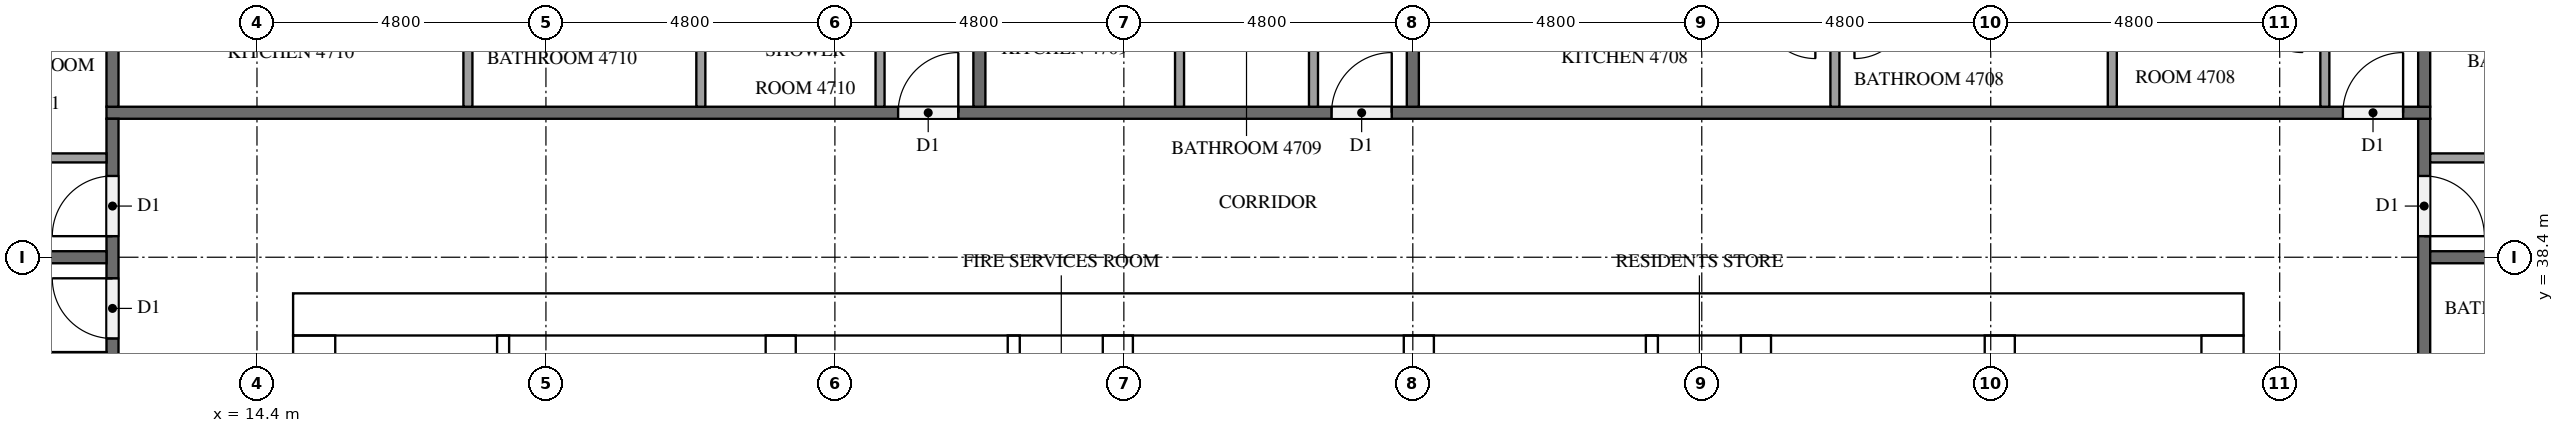
"""IFC4 building model, lengths in metres.
Left out: names, types, materials, properties, quantities, classifications, styles, units other than length and angle.
Written with IfcOpenShell. Run it as: python <this file> out.ifc"""

import sys

from ifc_helpers import new_model, si_unit, direction, frame, frame_2d, origin, place, context, subcontext, project, spatial, rectangle, extrude, element, fill, save


model = new_model("IFC4")
c1 = context("Model", 3, precision=1e-05, world=origin(), true_north=direction((0.0, 1.0)))
c2 = subcontext(c1, "Body", "Model", "MODEL_VIEW")
j1 = project(units=[si_unit("LENGTHUNIT", "METRE"), si_unit("PLANEANGLEUNIT", "RADIAN")], contexts=[c1])
p1 = place(None, origin())
s1 = spatial("IfcSite", under=j1, at=p1, CompositionType="ELEMENT")
p2 = place(p1, origin())
s2 = spatial("IfcBuilding", under=s1, at=p2, CompositionType="ELEMENT")
p3 = place(p2, frame((0.0, 0.0, 182.4)))
s3 = spatial("IfcBuildingStorey", under=s2, at=p3, CompositionType="ELEMENT", Elevation=182.4)
p4 = place(p3, frame((15.0, 37.45, 0.0), z_axis=(0.0, 0.0, 1.0), x_axis=(1.0, 0.0, 0.0)))
e1 = element("IfcWall", 1, at=p4, inside=s3, PredefinedType="SHEAR", context=c2, shape_type="SweptSolid", body=[
    extrude(rectangle(XDim=32.4, YDim=0.7, at=frame_2d((16.2, 0.0))), origin(), (0.0, 0.0, 1.0), 3.2),
])
p5 = place(p4, frame((15.3, 0.0, 0.0)))
e2 = element("IfcOpeningElement", 2, at=p5, cuts=e1, PredefinedType="OPENING", context=c2, shape_type="SweptSolid", body=[
    extrude(rectangle(XDim=1.8, YDim=2.1, at=frame_2d((0.9, 1.05))), frame((0.0, 0.36, 0.0), z_axis=(0.0, -1.0, 0.0), x_axis=(1.0, 0.0, 0.0)), (0.0, 0.0, 1.0), 0.72),
])
p6 = place(p4, frame((1.544, 0.0, 0.0)))
e3 = element("IfcOpeningElement", 3, at=p6, cuts=e1, PredefinedType="OPENING", context=c2, shape_type="SweptSolid", body=[
    extrude(rectangle(XDim=1.0, YDim=2.1, at=frame_2d((0.5, 1.05))), frame((0.0, 0.36, 0.0), z_axis=(0.0, -1.0, 0.0), x_axis=(1.0, 0.0, 0.0)), (0.0, 0.0, 1.0), 0.72),
])
p7 = place(p4, frame((5.219, 0.0, 0.0)))
e4 = element("IfcOpeningElement", 4, at=p7, cuts=e1, PredefinedType="OPENING", context=c2, shape_type="SweptSolid", body=[
    extrude(rectangle(XDim=1.0, YDim=2.1, at=frame_2d((0.5, 1.05))), frame((0.0, 0.36, 0.0), z_axis=(0.0, -1.0, 0.0), x_axis=(1.0, 0.0, 0.0)), (0.0, 0.0, 1.0), 0.72),
])
p8 = place(p3, frame((15.35, 15.7, 0.0), z_axis=(0.0, 0.0, 1.0), x_axis=(0.0, 1.0, 0.0)))
e5 = element("IfcWall", 5, at=p8, inside=s3, PredefinedType="SHEAR", context=c2, shape_type="SweptSolid", body=[
    extrude(rectangle(XDim=21.4, YDim=0.7, at=frame_2d((10.7, 0.0))), origin(), (0.0, 0.0, 1.0), 3.2),
])
p9 = place(p8, frame((5.06, 0.0, 0.0)))
e6 = element("IfcOpeningElement", 6, at=p9, cuts=e5, PredefinedType="OPENING", context=c2, shape_type="SweptSolid", body=[
    extrude(rectangle(XDim=1.2, YDim=2.1, at=frame_2d((0.6, 1.05))), frame((0.0, 0.36, 0.0), z_axis=(0.0, -1.0, 0.0), x_axis=(1.0, 0.0, 0.0)), (0.0, 0.0, 1.0), 0.72),
])
p10 = place(p3, frame((47.05, 15.7, 0.0), z_axis=(0.0, 0.0, 1.0), x_axis=(0.0, 1.0, 0.0)))
e7 = element("IfcWall", 7, at=p10, inside=s3, PredefinedType="SHEAR", context=c2, shape_type="SweptSolid", body=[
    extrude(rectangle(XDim=21.4, YDim=0.7, at=frame_2d((10.7, 0.0))), origin(), (0.0, 0.0, 1.0), 3.2),
])
p11 = place(p10, frame((10.4, 0.0, 0.0)))
e8 = element("IfcOpeningElement", 8, at=p11, cuts=e7, PredefinedType="OPENING", context=c2, shape_type="SweptSolid", body=[
    extrude(rectangle(XDim=1.2, YDim=2.1, at=frame_2d((0.6, 1.05))), frame((0.0, 0.36, 0.0), z_axis=(0.0, -1.0, 0.0), x_axis=(1.0, 0.0, 0.0)), (0.0, 0.0, 1.0), 0.72),
])
p12 = place(p3, frame((23.1, 15.7, 0.0), z_axis=(0.0, 0.0, 1.0), x_axis=(0.0, 1.0, 0.0)))
e9 = element("IfcWall", 9, at=p12, inside=s3, PredefinedType="SHEAR", context=c2, shape_type="SweptSolid", body=[
    extrude(rectangle(XDim=21.4, YDim=0.5, at=frame_2d((10.7, 0.0))), origin(), (0.0, 0.0, 1.0), 3.2),
])
p13 = place(p3, frame((39.3, 27.75, 0.0), z_axis=(0.0, 0.0, 1.0), x_axis=(0.0, 1.0, 0.0)))
e10 = element("IfcWall", 10, at=p13, inside=s3, PredefinedType="SHEAR", context=c2, shape_type="SweptSolid", body=[
    extrude(rectangle(XDim=9.35, YDim=0.5, at=frame_2d((4.675, 0.0))), origin(), (0.0, 0.0, 1.0), 3.2),
])
p14 = place(p3, frame((43.35, 27.75, 0.0), z_axis=(0.0, 0.0, 1.0), x_axis=(0.0, 1.0, 0.0)))
e11 = element("IfcWall", 11, at=p14, inside=s3, PredefinedType="SHEAR", context=c2, shape_type="SweptSolid", body=[
    extrude(rectangle(XDim=9.35, YDim=0.5, at=frame_2d((4.675, 0.0))), origin(), (0.0, 0.0, 1.0), 3.2),
])
p15 = place(p14, frame((7.65, 0.0, 0.0)))
e12 = element("IfcOpeningElement", 12, at=p15, cuts=e11, PredefinedType="OPENING", context=c2, shape_type="SweptSolid", body=[
    extrude(rectangle(XDim=1.2, YDim=2.1, at=frame_2d((0.6, 1.05))), frame((0.0, 0.26, 0.0), z_axis=(0.0, -1.0, 0.0), x_axis=(1.0, 0.0, 0.0)), (0.0, 0.0, 1.0), 0.52),
])
for number, where, z_axis, x_axis in (
    (13, (28.7, 33.8, 0.0), (0.0, 0.0, 1.0), (0.0, 1.0, 0.0)),
    (14, (33.7, 33.8, 0.0), (0.0, 0.0, 1.0), (0.0, 1.0, 0.0)),
):
    element("IfcWall", number, at=place(p3, frame(where, z_axis=z_axis, x_axis=x_axis)), inside=s3, PredefinedType="SHEAR", context=c2, shape_type="SweptSolid", body=[
        extrude(rectangle(XDim=3.3, YDim=0.5, at=frame_2d((1.65, 0.0))), origin(), (0.0, 0.0, 1.0), 3.2),
    ])
p16 = place(p3, frame((18.489, 31.5, 0.0), z_axis=(0.0, 0.0, 1.0), x_axis=(0.0, 1.0, 0.0)))
e15 = element("IfcWall", 15, at=p16, inside=s3, PredefinedType="PARTITIONING", context=c2, shape_type="SweptSolid", body=[
    extrude(rectangle(XDim=5.6, YDim=0.2, at=frame_2d((2.8, 0.0))), origin(), (0.0, 0.0, 1.0), 3.2),
])
for number, where, z_axis, x_axis in (
    (16, (26.971, 33.8, 0.0), (0.0, 0.0, 1.0), (0.0, 1.0, 0.0)),
    (17, (37.571, 33.8, 0.0), (0.0, 0.0, 1.0), (0.0, 1.0, 0.0)),
):
    element("IfcWall", number, at=place(p3, frame(where, z_axis=z_axis, x_axis=x_axis)), inside=s3, PredefinedType="PARTITIONING", context=c2, shape_type="SweptSolid", body=[
        extrude(rectangle(XDim=3.3, YDim=0.2, at=frame_2d((1.65, 0.0))), origin(), (0.0, 0.0, 1.0), 3.2),
    ])
p17 = place(p3, frame((50.4, 40.7, 0.0), z_axis=(0.0, 0.0, 1.0), x_axis=(0.0, -1.0, 0.0)))
e18 = element("IfcWall", 18, at=p17, inside=s3, PredefinedType="PARTITIONING", context=c2, shape_type="SweptSolid", body=[
    extrude(rectangle(XDim=28.6, YDim=0.2, at=frame_2d((14.3, 0.0))), origin(), (0.0, 0.0, 1.0), 3.2),
])
p18 = place(p17, frame((27.3, 0.0, 0.0)))
e19 = element("IfcOpeningElement", 19, at=p18, cuts=e18, PredefinedType="OPENING", context=c2, shape_type="SweptSolid", body=[
    extrude(rectangle(XDim=1.1, YDim=2.1, at=frame_2d((0.55, 1.05))), frame((0.0, 0.11, 0.0), z_axis=(0.0, -1.0, 0.0), x_axis=(1.0, 0.0, 0.0)), (0.0, 0.0, 1.0), 0.22),
])
p19 = place(p17, frame((8.15, 0.0, 0.0)))
e20 = element("IfcOpeningElement", 20, at=p19, cuts=e18, PredefinedType="OPENING", context=c2, shape_type="SweptSolid", body=[
    extrude(rectangle(XDim=1.0, YDim=2.1, at=frame_2d((0.5, 1.05))), frame((0.0, 0.11, 0.0), z_axis=(0.0, -1.0, 0.0), x_axis=(1.0, 0.0, 0.0)), (0.0, 0.0, 1.0), 0.22),
])
p20 = place(p17, frame((0.95, 0.0, 0.0)))
e21 = element("IfcOpeningElement", 21, at=p20, cuts=e18, PredefinedType="OPENING", context=c2, shape_type="SweptSolid", body=[
    extrude(rectangle(XDim=1.0, YDim=2.1, at=frame_2d((0.5, 1.05))), frame((0.0, 0.11, 0.0), z_axis=(0.0, -1.0, 0.0), x_axis=(1.0, 0.0, 0.0)), (0.0, 0.0, 1.0), 0.22),
])
p21 = place(p3, frame((11.9, 40.8, 0.0), z_axis=(0.0, 0.0, 1.0), x_axis=(1.0, 0.0, 0.0)))
e22 = element("IfcWall", 22, at=p21, inside=s3, PredefinedType="PARTITIONING", context=c2, shape_type="SweptSolid", body=[
    extrude(rectangle(XDim=38.6, YDim=0.2, at=frame_2d((19.3, 0.0))), origin(), (0.0, 0.0, 1.0), 3.2),
])
p22 = place(p21, frame((37.15, 0.0, 0.0)))
e23 = element("IfcOpeningElement", 23, at=p22, cuts=e22, PredefinedType="OPENING", context=c2, shape_type="SweptSolid", body=[
    extrude(rectangle(XDim=1.0, YDim=2.1, at=frame_2d((0.5, 1.05))), frame((0.0, 0.11, 0.0), z_axis=(0.0, -1.0, 0.0), x_axis=(1.0, 0.0, 0.0)), (0.0, 0.0, 1.0), 0.22),
])
p23 = place(p21, frame((20.35, 0.0, 0.0)))
e24 = element("IfcOpeningElement", 24, at=p23, cuts=e22, PredefinedType="OPENING", context=c2, shape_type="SweptSolid", body=[
    extrude(rectangle(XDim=1.0, YDim=2.1, at=frame_2d((0.5, 1.05))), frame((0.0, 0.11, 0.0), z_axis=(0.0, -1.0, 0.0), x_axis=(1.0, 0.0, 0.0)), (0.0, 0.0, 1.0), 0.22),
])
p24 = place(p21, frame((13.15, 0.0, 0.0)))
e25 = element("IfcOpeningElement", 25, at=p24, cuts=e22, PredefinedType="OPENING", context=c2, shape_type="SweptSolid", body=[
    extrude(rectangle(XDim=1.0, YDim=2.1, at=frame_2d((0.5, 1.05))), frame((0.0, 0.11, 0.0), z_axis=(0.0, -1.0, 0.0), x_axis=(1.0, 0.0, 0.0)), (0.0, 0.0, 1.0), 0.22),
])
p25 = place(p3, frame((12.0, 12.1, 0.0), z_axis=(0.0, 0.0, 1.0), x_axis=(0.0, 1.0, 0.0)))
e26 = element("IfcWall", 26, at=p25, inside=s3, PredefinedType="PARTITIONING", context=c2, shape_type="SweptSolid", body=[
    extrude(rectangle(XDim=28.6, YDim=0.2, at=frame_2d((14.3, 0.0))), origin(), (0.0, 0.0, 1.0), 3.2),
])
p26 = place(p25, frame((26.65, 0.0, 0.0)))
e27 = element("IfcOpeningElement", 27, at=p26, cuts=e26, PredefinedType="OPENING", context=c2, shape_type="SweptSolid", body=[
    extrude(rectangle(XDim=1.0, YDim=2.1, at=frame_2d((0.5, 1.05))), frame((0.0, 0.11, 0.0), z_axis=(0.0, -1.0, 0.0), x_axis=(1.0, 0.0, 0.0)), (0.0, 0.0, 1.0), 0.22),
])
p27 = place(p25, frame((24.95, 0.0, 0.0)))
e28 = element("IfcOpeningElement", 28, at=p27, cuts=e26, PredefinedType="OPENING", context=c2, shape_type="SweptSolid", body=[
    extrude(rectangle(XDim=1.0, YDim=2.1, at=frame_2d((0.5, 1.05))), frame((0.0, 0.11, 0.0), z_axis=(0.0, -1.0, 0.0), x_axis=(1.0, 0.0, 0.0)), (0.0, 0.0, 1.0), 0.22),
])
p28 = place(p25, frame((12.95, 0.0, 0.0)))
e29 = element("IfcOpeningElement", 29, at=p28, cuts=e26, PredefinedType="OPENING", context=c2, shape_type="SweptSolid", body=[
    extrude(rectangle(XDim=1.0, YDim=2.1, at=frame_2d((0.5, 1.05))), frame((0.0, 0.11, 0.0), z_axis=(0.0, -1.0, 0.0), x_axis=(1.0, 0.0, 0.0)), (0.0, 0.0, 1.0), 0.22),
])
p29 = place(p3, frame((50.5, 38.4, 0.0), z_axis=(0.0, 0.0, 1.0), x_axis=(1.0, 0.0, 0.0)))
e30 = element("IfcWall", 30, at=p29, inside=s3, PredefinedType="PARTITIONING", context=c2, shape_type="SweptSolid", body=[
    extrude(rectangle(XDim=11.8, YDim=0.2, at=frame_2d((5.9, 0.0))), origin(), (0.0, 0.0, 1.0), 3.2),
])
for number, where, z_axis, x_axis in (
    (31, (50.4, 40.9, 0.0), (0.0, 0.0, 1.0), (0.0, 1.0, 0.0)),
    (32, (33.6, 47.9, 0.0), (0.0, 0.0, 1.0), (0.0, -1.0, 0.0)),
    (33, (26.4, 47.9, 0.0), (0.0, 0.0, 1.0), (0.0, -1.0, 0.0)),
    (34, (12.0, 47.9, 0.0), (0.0, 0.0, 1.0), (0.0, -1.0, 0.0)),
    (35, (4.9, 38.4, 0.0), (0.0, 0.0, 1.0), (1.0, 0.0, 0.0)),
):
    element("IfcWall", number, at=place(p3, frame(where, z_axis=z_axis, x_axis=x_axis)), inside=s3, PredefinedType="PARTITIONING", context=c2, shape_type="SweptSolid", body=[
        extrude(rectangle(XDim=7.0, YDim=0.2, at=frame_2d((3.5, 0.0))), origin(), (0.0, 0.0, 1.0), 3.2),
    ])
p30 = place(p3, frame((50.5, 40.05, 0.0), z_axis=(0.0, 0.0, 1.0), x_axis=(1.0, 0.0, 0.0)))
e36 = element("IfcWall", 36, at=p30, inside=s3, PredefinedType="PARTITIONING", context=c2, shape_type="SweptSolid", body=[
    extrude(rectangle(XDim=3.875, YDim=0.15, at=frame_2d((1.938, 0.0))), origin(), (0.0, 0.0, 1.0), 3.2),
])
for number, where, z_axis, x_axis in (
    (37, (45.219, 40.9, 0.0), (0.0, 0.0, 1.0), (0.0, 1.0, 0.0)),
    (38, (40.612, 40.9, 0.0), (0.0, 0.0, 1.0), (0.0, 1.0, 0.0)),
):
    element("IfcWall", number, at=place(p3, frame(where, z_axis=z_axis, x_axis=x_axis)), inside=s3, PredefinedType="PARTITIONING", context=c2, shape_type="SweptSolid", body=[
        extrude(rectangle(XDim=1.625, YDim=0.15, at=frame_2d((0.812, 0.0))), origin(), (0.0, 0.0, 1.0), 3.2),
    ])
p31 = place(p3, frame((48.75, 40.9, 0.0), z_axis=(0.0, 0.0, 1.0), x_axis=(0.0, 1.0, 0.0)))
e39 = element("IfcWall", 39, at=p31, inside=s3, PredefinedType="PARTITIONING", context=c2, shape_type="SweptSolid", body=[
    extrude(rectangle(XDim=1.775, YDim=0.15, at=frame_2d((0.888, 0.0))), origin(), (0.0, 0.0, 1.0), 3.2),
])
p32 = place(p3, frame((29.725, 40.9, 0.0), z_axis=(0.0, 0.0, 1.0), x_axis=(0.0, 1.0, 0.0)))
e40 = element("IfcWall", 40, at=p32, inside=s3, PredefinedType="PARTITIONING", context=c2, shape_type="SweptSolid", body=[
    extrude(rectangle(XDim=2.075, YDim=0.15, at=frame_2d((1.038, 0.0))), origin(), (0.0, 0.0, 1.0), 3.2),
])
p33 = place(p3, frame((31.95, 40.9, 0.0), z_axis=(0.0, 0.0, 1.0), x_axis=(0.0, 1.0, 0.0)))
e41 = element("IfcWall", 41, at=p33, inside=s3, PredefinedType="PARTITIONING", context=c2, shape_type="SweptSolid", body=[
    extrude(rectangle(XDim=2.225, YDim=0.15, at=frame_2d((1.113, 0.0))), origin(), (0.0, 0.0, 1.0), 3.2),
])
for number, where, z_axis, x_axis in (
    (42, (21.773, 40.9, 0.0), (0.0, 0.0, 1.0), (0.0, 1.0, 0.0)),
    (43, (17.904, 40.9, 0.0), (0.0, 0.0, 1.0), (0.0, 1.0, 0.0)),
):
    element("IfcWall", number, at=place(p3, frame(where, z_axis=z_axis, x_axis=x_axis)), inside=s3, PredefinedType="PARTITIONING", context=c2, shape_type="SweptSolid", body=[
        extrude(rectangle(XDim=1.775, YDim=0.15, at=frame_2d((0.888, 0.0))), origin(), (0.0, 0.0, 1.0), 3.2),
    ])
p34 = place(p3, frame((24.75, 40.9, 0.0), z_axis=(0.0, 0.0, 1.0), x_axis=(0.0, 1.0, 0.0)))
e44 = element("IfcWall", 44, at=p34, inside=s3, PredefinedType="PARTITIONING", context=c2, shape_type="SweptSolid", body=[
    extrude(rectangle(XDim=1.925, YDim=0.15, at=frame_2d((0.962, 0.0))), origin(), (0.0, 0.0, 1.0), 3.2),
])
p35 = place(p3, frame((11.9, 40.05, 0.0), z_axis=(0.0, 0.0, 1.0), x_axis=(-1.0, 0.0, 0.0)))
e45 = element("IfcWall", 45, at=p35, inside=s3, PredefinedType="PARTITIONING", context=c2, shape_type="SweptSolid", body=[
    extrude(rectangle(XDim=2.375, YDim=0.15, at=frame_2d((1.188, 0.0))), origin(), (0.0, 0.0, 1.0), 3.2),
])
p36 = place(p3, frame((11.9, 36.75, 0.0), z_axis=(0.0, 0.0, 1.0), x_axis=(-1.0, 0.0, 0.0)))
e46 = element("IfcWall", 46, at=p36, inside=s3, PredefinedType="PARTITIONING", context=c2, shape_type="SweptSolid", body=[
    extrude(rectangle(XDim=1.925, YDim=0.15, at=frame_2d((0.962, 0.0))), origin(), (0.0, 0.0, 1.0), 3.2),
])
p37 = place(p5, origin())
e47 = element("IfcDoor", 47, at=p37, inside=s3, OperationType="DOUBLE_DOOR_SINGLE_SWING", PredefinedType="DOOR", context=c2, shape_type="SweptSolid", body=[
    extrude(rectangle(XDim=1.8, YDim=2.1, at=frame_2d((0.9, 1.05))), frame((0.0, 0.025, 0.0), z_axis=(0.0, -1.0, 0.0), x_axis=(1.0, 0.0, 0.0)), (0.0, 0.0, 1.0), 0.05),
])
fill(e2, e47)
p38 = place(p6, origin())
e48 = element("IfcDoor", 48, at=p38, inside=s3, OperationType="SINGLE_SWING_RIGHT", PredefinedType="DOOR", context=c2, shape_type="SweptSolid", body=[
    extrude(rectangle(XDim=1.0, YDim=2.1, at=frame_2d((0.5, 1.05))), frame((0.0, 0.025, 0.0), z_axis=(0.0, -1.0, 0.0), x_axis=(1.0, 0.0, 0.0)), (0.0, 0.0, 1.0), 0.05),
])
fill(e3, e48)
p39 = place(p7, origin())
e49 = element("IfcDoor", 49, at=p39, inside=s3, OperationType="SINGLE_SWING_LEFT", PredefinedType="DOOR", context=c2, shape_type="SweptSolid", body=[
    extrude(rectangle(XDim=1.0, YDim=2.1, at=frame_2d((0.5, 1.05))), frame((0.0, 0.025, 0.0), z_axis=(0.0, -1.0, 0.0), x_axis=(1.0, 0.0, 0.0)), (0.0, 0.0, 1.0), 0.05),
])
fill(e4, e49)
p40 = place(p20, origin())
e50 = element("IfcDoor", 50, at=p40, inside=s3, OperationType="SINGLE_SWING_RIGHT", PredefinedType="DOOR", context=c2, shape_type="SweptSolid", body=[
    extrude(rectangle(XDim=1.0, YDim=2.1, at=frame_2d((0.5, 1.05))), frame((0.0, 0.025, 0.0), z_axis=(0.0, -1.0, 0.0), x_axis=(1.0, 0.0, 0.0)), (0.0, 0.0, 1.0), 0.05),
])
fill(e21, e50)
p41 = place(p22, origin())
e51 = element("IfcDoor", 51, at=p41, inside=s3, OperationType="SINGLE_SWING_RIGHT", PredefinedType="DOOR", context=c2, shape_type="SweptSolid", body=[
    extrude(rectangle(XDim=1.0, YDim=2.1, at=frame_2d((0.5, 1.05))), frame((0.0, 0.025, 0.0), z_axis=(0.0, -1.0, 0.0), x_axis=(1.0, 0.0, 0.0)), (0.0, 0.0, 1.0), 0.05),
])
fill(e23, e51)
p42 = place(p23, origin())
e52 = element("IfcDoor", 52, at=p42, inside=s3, OperationType="SINGLE_SWING_RIGHT", PredefinedType="DOOR", context=c2, shape_type="SweptSolid", body=[
    extrude(rectangle(XDim=1.0, YDim=2.1, at=frame_2d((0.5, 1.05))), frame((0.0, 0.025, 0.0), z_axis=(0.0, -1.0, 0.0), x_axis=(1.0, 0.0, 0.0)), (0.0, 0.0, 1.0), 0.05),
])
fill(e24, e52)
p43 = place(p24, origin())
e53 = element("IfcDoor", 53, at=p43, inside=s3, OperationType="SINGLE_SWING_RIGHT", PredefinedType="DOOR", context=c2, shape_type="SweptSolid", body=[
    extrude(rectangle(XDim=1.0, YDim=2.1, at=frame_2d((0.5, 1.05))), frame((0.0, 0.025, 0.0), z_axis=(0.0, -1.0, 0.0), x_axis=(1.0, 0.0, 0.0)), (0.0, 0.0, 1.0), 0.05),
])
fill(e25, e53)
p44 = place(p26, origin())
e54 = element("IfcDoor", 54, at=p44, inside=s3, OperationType="SINGLE_SWING_LEFT", PredefinedType="DOOR", context=c2, shape_type="SweptSolid", body=[
    extrude(rectangle(XDim=1.0, YDim=2.1, at=frame_2d((0.5, 1.05))), frame((0.0, 0.025, 0.0), z_axis=(0.0, -1.0, 0.0), x_axis=(1.0, 0.0, 0.0)), (0.0, 0.0, 1.0), 0.05),
])
fill(e27, e54)
p45 = place(p27, origin())
e55 = element("IfcDoor", 55, at=p45, inside=s3, OperationType="SINGLE_SWING_RIGHT", PredefinedType="DOOR", context=c2, shape_type="SweptSolid", body=[
    extrude(rectangle(XDim=1.0, YDim=2.1, at=frame_2d((0.5, 1.05))), frame((0.0, 0.025, 0.0), z_axis=(0.0, -1.0, 0.0), x_axis=(1.0, 0.0, 0.0)), (0.0, 0.0, 1.0), 0.05),
])
fill(e28, e55)
save(model, sys.argv[1])
